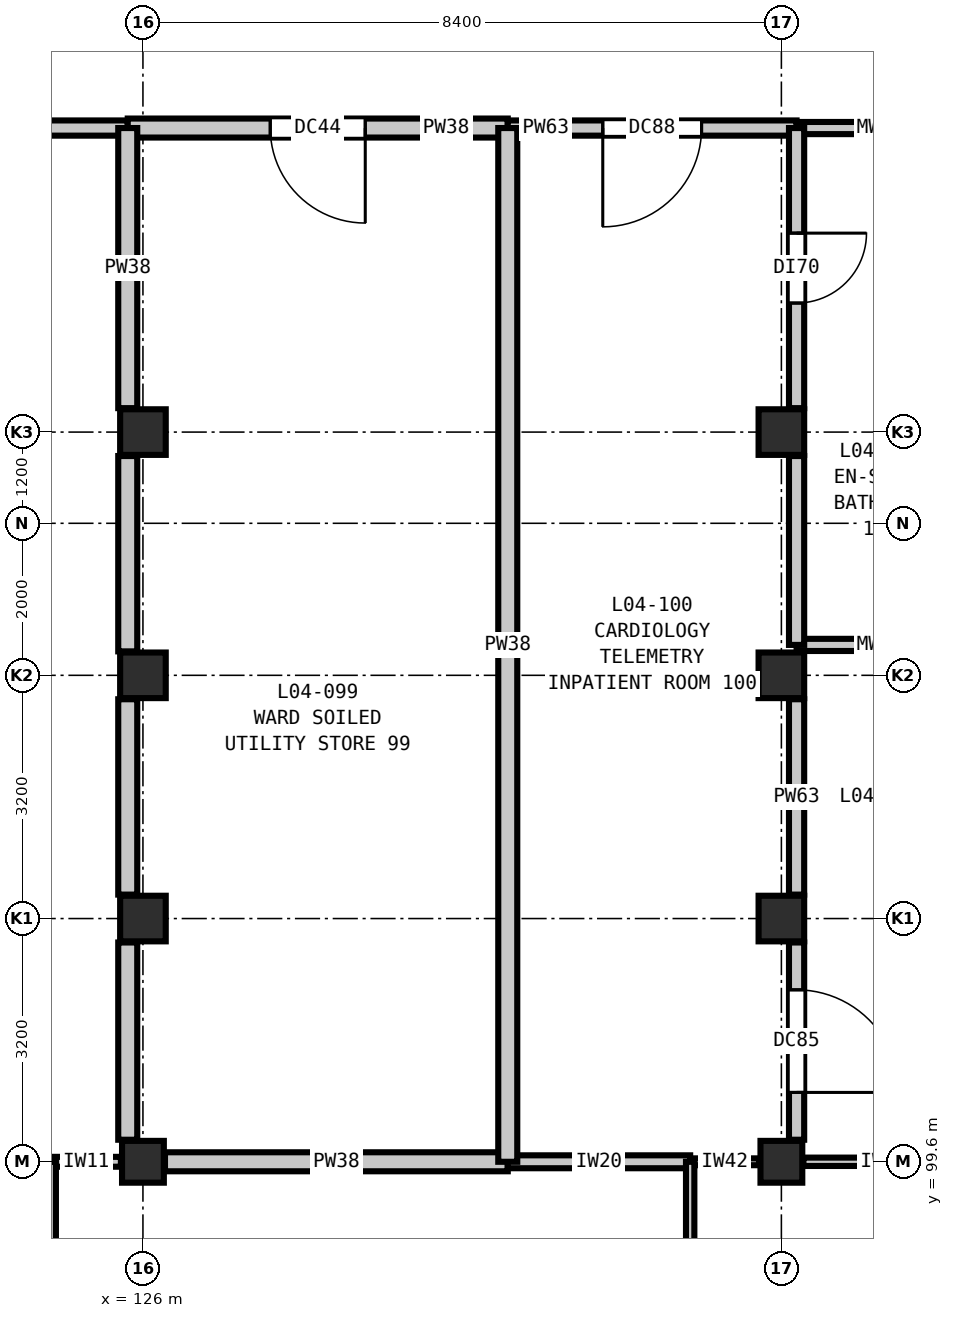
"""IFC4 building model, lengths in metres.
Left out: names, types, materials, properties, quantities, classifications, styles, units other than length and angle.
Written with IfcOpenShell. Run it as: python <this file> out.ifc"""

import sys

from ifc_helpers import new_model, si_unit, direction, frame, frame_2d, origin, origin_2d, place, context, subcontext, project, spatial, rectangle, extrude, element, fill, save


model = new_model("IFC4")
c1 = context("Model", 3, precision=1e-05, world=origin(), true_north=direction((0.0, 1.0)))
c2 = subcontext(c1, "Body", "Model", "MODEL_VIEW")
j1 = project(units=[si_unit("LENGTHUNIT", "METRE"), si_unit("PLANEANGLEUNIT", "RADIAN")], contexts=[c1])
p1 = place(None, origin())
s1 = spatial("IfcSite", under=j1, at=p1, CompositionType="ELEMENT")
p2 = place(p1, origin())
s2 = spatial("IfcBuilding", under=s1, at=p2, CompositionType="ELEMENT")
p3 = place(p2, frame((0.0, 0.0, 20.4)))
s3 = spatial("IfcBuildingStorey", under=s2, at=p3, CompositionType="ELEMENT", Elevation=20.4)
p4 = place(p3, frame((126.0, 99.6, 0.0), z_axis=(0.0, 0.0, 1.0), x_axis=(1.0, 0.0, 0.0)))
e1 = element("IfcColumn", 1, at=p4, inside=s3, PredefinedType="COLUMN", context=c2, shape_type="SweptSolid", body=[
    extrude(rectangle(XDim=0.55, YDim=0.55, at=origin_2d()), origin(), (0.0, 0.0, 1.0), 4.2),
])
for number, where, z_axis, x_axis in (
    (2, (126.0, 102.8, 0.0), (0.0, 0.0, 1.0), (1.0, 0.0, 0.0)),
    (3, (126.0, 106.0, 0.0), (0.0, 0.0, 1.0), (1.0, 0.0, 0.0)),
    (4, (126.0, 109.2, 0.0), (0.0, 0.0, 1.0), (1.0, 0.0, 0.0)),
):
    element("IfcColumn", number, at=place(p3, frame(where, z_axis=z_axis, x_axis=x_axis)), inside=s3, PredefinedType="COLUMN", context=c2, shape_type="SweptSolid", body=[
        extrude(rectangle(XDim=0.6, YDim=0.6, at=origin_2d()), origin(), (0.0, 0.0, 1.0), 4.2),
    ])
p5 = place(p3, frame((134.4, 99.6, 0.0), z_axis=(0.0, 0.0, 1.0), x_axis=(1.0, 0.0, 0.0)))
e5 = element("IfcColumn", 5, at=p5, inside=s3, PredefinedType="COLUMN", context=c2, shape_type="SweptSolid", body=[
    extrude(rectangle(XDim=0.55, YDim=0.55, at=origin_2d()), origin(), (0.0, 0.0, 1.0), 4.2),
])
for number, where, z_axis, x_axis in (
    (6, (134.4, 102.8, 0.0), (0.0, 0.0, 1.0), (1.0, 0.0, 0.0)),
    (7, (134.4, 106.0, 0.0), (0.0, 0.0, 1.0), (1.0, 0.0, 0.0)),
    (8, (134.4, 109.2, 0.0), (0.0, 0.0, 1.0), (1.0, 0.0, 0.0)),
):
    element("IfcColumn", number, at=place(p3, frame(where, z_axis=z_axis, x_axis=x_axis)), inside=s3, PredefinedType="COLUMN", context=c2, shape_type="SweptSolid", body=[
        extrude(rectangle(XDim=0.6, YDim=0.6, at=origin_2d()), origin(), (0.0, 0.0, 1.0), 4.2),
    ])
p6 = place(p3, frame((122.6, 99.6, 0.0), z_axis=(0.0, 0.0, 1.0), x_axis=(1.0, 0.0, 0.0)))
e9 = element("IfcWall", 9, at=p6, inside=s3, PredefinedType="PARTITIONING", context=c2, shape_type="SweptSolid", body=[
    extrude(rectangle(XDim=2.2, YDim=0.11, at=frame_2d((1.1, 0.0))), origin(), (0.0, 0.0, 1.0), 3.585),
])
p7 = place(p3, frame((124.8, 99.6, 0.0), z_axis=(0.0, 0.0, 1.0), x_axis=(1.0, 0.0, 0.0)))
e10 = element("IfcWall", 10, at=p7, inside=s3, PredefinedType="PARTITIONING", context=c2, shape_type="SweptSolid", body=[
    extrude(rectangle(XDim=0.91, YDim=0.13, at=frame_2d((0.455, 0.0))), origin(), (0.0, 0.0, 1.0), 3.585),
])
p8 = place(p3, frame((126.29, 99.6, 0.0), z_axis=(0.0, 0.0, 1.0), x_axis=(1.0, 0.0, 0.0)))
e11 = element("IfcWall", 11, at=p8, inside=s3, PredefinedType="PARTITIONING", context=c2, shape_type="SweptSolid", body=[
    extrude(rectangle(XDim=4.51, YDim=0.25, at=frame_2d((2.255, 0.0))), origin(), (0.0, 0.0, 1.0), 3.585),
])
p9 = place(p3, frame((130.8, 99.6, 0.0), z_axis=(0.0, 0.0, 1.0), x_axis=(1.0, 0.0, 0.0)))
e12 = element("IfcWall", 12, at=p9, inside=s3, PredefinedType="PARTITIONING", context=c2, shape_type="SweptSolid", body=[
    extrude(rectangle(XDim=2.4, YDim=0.17, at=frame_2d((1.2, 0.0))), origin(), (0.0, 0.0, 1.0), 3.585),
])
p10 = place(p3, frame((133.2, 99.6, 0.0), z_axis=(0.0, 0.0, 1.0), x_axis=(1.0, 0.0, 0.0)))
e13 = element("IfcWall", 13, at=p10, inside=s3, PredefinedType="PARTITIONING", context=c2, shape_type="SweptSolid", body=[
    extrude(rectangle(XDim=0.91, YDim=0.09, at=frame_2d((0.455, 0.0))), origin(), (0.0, 0.0, 1.0), 3.585),
])
p11 = place(p3, frame((134.69, 99.6, 0.0), z_axis=(0.0, 0.0, 1.0), x_axis=(1.0, 0.0, 0.0)))
e14 = element("IfcWall", 14, at=p11, inside=s3, PredefinedType="PARTITIONING", context=c2, shape_type="SweptSolid", body=[
    extrude(rectangle(XDim=2.11, YDim=0.11, at=frame_2d((1.055, 0.0))), origin(), (0.0, 0.0, 1.0), 3.585),
])
p12 = place(p3, frame((134.6, 106.4, 0.0), z_axis=(0.0, 0.0, 1.0), x_axis=(1.0, 0.0, 0.0)))
e15 = element("IfcWall", 15, at=p12, inside=s3, PredefinedType="PLUMBINGWALL", context=c2, shape_type="SweptSolid", body=[
    extrude(rectangle(XDim=2.2, YDim=0.16, at=frame_2d((1.1, 0.0))), origin(), (0.0, 0.0, 1.0), 3.82),
])
p13 = place(p3, frame((118.8, 113.2, 0.0), z_axis=(0.0, 0.0, 1.0), x_axis=(1.0, 0.0, 0.0)))
e16 = element("IfcWall", 16, at=p13, inside=s3, PredefinedType="PARTITIONING", context=c2, shape_type="SweptSolid", body=[
    extrude(rectangle(XDim=7.0, YDim=0.2, at=frame_2d((3.5, 0.0))), origin(), (0.0, 0.0, 1.0), 3.82),
])
p14 = place(p13, frame((2.575, 0.0, 0.0)))
e17 = element("IfcOpeningElement", 17, at=p14, cuts=e16, PredefinedType="OPENING", context=c2, shape_type="SweptSolid", body=[
    extrude(rectangle(XDim=1.85, YDim=2.3, at=frame_2d((0.925, 1.15))), frame((0.0, 0.11, 0.0), z_axis=(0.0, -1.0, 0.0), x_axis=(1.0, 0.0, 0.0)), (0.0, 0.0, 1.0), 0.22),
])
p15 = place(p3, frame((125.8, 113.2, 0.0), z_axis=(0.0, 0.0, 1.0), x_axis=(1.0, 0.0, 0.0)))
e18 = element("IfcWall", 18, at=p15, inside=s3, PredefinedType="PARTITIONING", context=c2, shape_type="SweptSolid", body=[
    extrude(rectangle(XDim=5.0, YDim=0.25, at=frame_2d((2.5, 0.0))), origin(), (0.0, 0.0, 1.0), 3.82),
])
p16 = place(p15, frame((1.875, 0.0, 0.0)))
e19 = element("IfcOpeningElement", 19, at=p16, cuts=e18, PredefinedType="OPENING", context=c2, shape_type="SweptSolid", body=[
    extrude(rectangle(XDim=1.25, YDim=2.15, at=frame_2d((0.625, 1.075))), frame((0.0, 0.135, 0.0), z_axis=(0.0, -1.0, 0.0), x_axis=(1.0, 0.0, 0.0)), (0.0, 0.0, 1.0), 0.27),
])
p17 = place(p3, frame((130.8, 113.2, 0.0), z_axis=(0.0, 0.0, 1.0), x_axis=(1.0, 0.0, 0.0)))
e20 = element("IfcWall", 20, at=p17, inside=s3, PredefinedType="PARTITIONING", context=c2, shape_type="SweptSolid", body=[
    extrude(rectangle(XDim=3.8, YDim=0.2, at=frame_2d((1.9, 0.0))), origin(), (0.0, 0.0, 1.0), 3.82),
])
p18 = place(p17, frame((1.25, 0.0, 0.0)))
e21 = element("IfcOpeningElement", 21, at=p18, cuts=e20, PredefinedType="OPENING", context=c2, shape_type="SweptSolid", body=[
    extrude(rectangle(XDim=1.3, YDim=2.2, at=frame_2d((0.65, 1.1))), frame((0.0, 0.11, 0.0), z_axis=(0.0, -1.0, 0.0), x_axis=(1.0, 0.0, 0.0)), (0.0, 0.0, 1.0), 0.22),
])
p19 = place(p3, frame((134.6, 113.2, 0.0), z_axis=(0.0, 0.0, 1.0), x_axis=(1.0, 0.0, 0.0)))
e22 = element("IfcWall", 22, at=p19, inside=s3, PredefinedType="PLUMBINGWALL", context=c2, shape_type="SweptSolid", body=[
    extrude(rectangle(XDim=2.2, YDim=0.16, at=frame_2d((1.1, 0.0))), origin(), (0.0, 0.0, 1.0), 3.82),
])
p20 = place(p3, frame((124.8, 94.1, 0.0), z_axis=(0.0, 0.0, 1.0), x_axis=(0.0, 1.0, 0.0)))
e23 = element("IfcWall", 23, at=p20, inside=s3, PredefinedType="PARTITIONING", context=c2, shape_type="SweptSolid", body=[
    extrude(rectangle(XDim=5.5, YDim=0.11, at=frame_2d((2.75, 0.0))), origin(), (0.0, 0.0, 1.0), 3.82),
])
p21 = place(p3, frame((125.8, 109.515, 0.0), z_axis=(0.0, 0.0, 1.0), x_axis=(0.0, 1.0, 0.0)))
e24 = element("IfcWall", 24, at=p21, inside=s3, PredefinedType="PARTITIONING", context=c2, shape_type="SweptSolid", body=[
    extrude(rectangle(XDim=3.685, YDim=0.25, at=frame_2d((1.843, 0.0))), origin(), (0.0, 0.0, 1.0), 3.585),
])
p22 = place(p3, frame((125.8, 99.89, 0.0), z_axis=(0.0, 0.0, 1.0), x_axis=(0.0, 1.0, 0.0)))
e25 = element("IfcWall", 25, at=p22, inside=s3, PredefinedType="PARTITIONING", context=c2, shape_type="SweptSolid", body=[
    extrude(rectangle(XDim=2.595, YDim=0.25, at=frame_2d((1.298, 0.0))), origin(), (0.0, 0.0, 1.0), 3.585),
])
for number, where, z_axis, x_axis in (
    (26, (125.8, 103.115, 0.0), (0.0, 0.0, 1.0), (0.0, 1.0, 0.0)),
    (27, (125.8, 106.315, 0.0), (0.0, 0.0, 1.0), (0.0, 1.0, 0.0)),
):
    element("IfcWall", number, at=place(p3, frame(where, z_axis=z_axis, x_axis=x_axis)), inside=s3, PredefinedType="PARTITIONING", context=c2, shape_type="SweptSolid", body=[
        extrude(rectangle(XDim=2.57, YDim=0.25, at=frame_2d((1.285, 0.0))), origin(), (0.0, 0.0, 1.0), 3.585),
    ])
p23 = place(p3, frame((130.8, 99.6, 0.0), z_axis=(0.0, 0.0, 1.0), x_axis=(0.0, 1.0, 0.0)))
e28 = element("IfcWall", 28, at=p23, inside=s3, PredefinedType="PARTITIONING", context=c2, shape_type="SweptSolid", body=[
    extrude(rectangle(XDim=13.6, YDim=0.25, at=frame_2d((6.8, 0.0))), origin(), (0.0, 0.0, 1.0), 3.82),
])
p24 = place(p3, frame((133.2, 88.6, 0.0), z_axis=(0.0, 0.0, 1.0), x_axis=(0.0, 1.0, 0.0)))
e29 = element("IfcWall", 29, at=p24, inside=s3, PredefinedType="PARTITIONING", context=c2, shape_type="SweptSolid", body=[
    extrude(rectangle(XDim=11.0, YDim=0.11, at=frame_2d((5.5, 0.0))), origin(), (0.0, 0.0, 1.0), 3.82),
])
p25 = place(p3, frame((134.6, 99.89, 0.0), z_axis=(0.0, 0.0, 1.0), x_axis=(0.0, 1.0, 0.0)))
e30 = element("IfcWall", 30, at=p25, inside=s3, PredefinedType="PARTITIONING", context=c2, shape_type="SweptSolid", body=[
    extrude(rectangle(XDim=2.595, YDim=0.2, at=frame_2d((1.298, 0.0))), origin(), (0.0, 0.0, 1.0), 3.585),
])
p26 = place(p25, frame((0.623, 0.0, 0.0)))
e31 = element("IfcOpeningElement", 31, at=p26, cuts=e30, PredefinedType="OPENING", context=c2, shape_type="SweptSolid", body=[
    extrude(rectangle(XDim=1.35, YDim=2.2, at=frame_2d((0.675, 1.1))), frame((0.0, 0.11, 0.0), z_axis=(0.0, -1.0, 0.0), x_axis=(1.0, 0.0, 0.0)), (0.0, 0.0, 1.0), 0.22),
])
p27 = place(p3, frame((134.6, 103.115, 0.0), z_axis=(0.0, 0.0, 1.0), x_axis=(0.0, 1.0, 0.0)))
e32 = element("IfcWall", 32, at=p27, inside=s3, PredefinedType="PARTITIONING", context=c2, shape_type="SweptSolid", body=[
    extrude(rectangle(XDim=2.57, YDim=0.2, at=frame_2d((1.285, 0.0))), origin(), (0.0, 0.0, 1.0), 3.585),
])
p28 = place(p3, frame((134.6, 109.515, 0.0), z_axis=(0.0, 0.0, 1.0), x_axis=(0.0, 1.0, 0.0)))
e33 = element("IfcWall", 33, at=p28, inside=s3, PredefinedType="PARTITIONING", context=c2, shape_type="SweptSolid", body=[
    extrude(rectangle(XDim=3.685, YDim=0.2, at=frame_2d((1.843, 0.0))), origin(), (0.0, 0.0, 1.0), 3.585),
])
p29 = place(p28, frame((1.383, 0.0, 0.0)))
e34 = element("IfcOpeningElement", 34, at=p29, cuts=e33, PredefinedType="OPENING", context=c2, shape_type="SweptSolid", body=[
    extrude(rectangle(XDim=0.92, YDim=2.1, at=frame_2d((0.46, 1.05))), frame((0.0, 0.11, 0.0), z_axis=(0.0, -1.0, 0.0), x_axis=(1.0, 0.0, 0.0)), (0.0, 0.0, 1.0), 0.22),
])
p30 = place(p3, frame((134.6, 106.4, 0.0), z_axis=(0.0, 0.0, 1.0), x_axis=(0.0, 1.0, 0.0)))
e35 = element("IfcWall", 35, at=p30, inside=s3, PredefinedType="PARTITIONING", context=c2, shape_type="SweptSolid", body=[
    extrude(rectangle(XDim=2.485, YDim=0.2, at=frame_2d((1.243, 0.0))), origin(), (0.0, 0.0, 1.0), 3.585),
])
p31 = place(p16, frame((1.25, 0.0, 0.0), z_axis=(0.0, 0.0, 1.0), x_axis=(-1.0, 0.0, 0.0)))
e36 = element("IfcDoor", 36, at=p31, inside=s3, OperationType="SINGLE_SWING_LEFT", PredefinedType="DOOR", context=c2, shape_type="SweptSolid", body=[
    extrude(rectangle(XDim=1.25, YDim=2.15, at=frame_2d((0.625, 1.075))), frame((0.0, 0.025, 0.0), z_axis=(0.0, -1.0, 0.0), x_axis=(1.0, 0.0, 0.0)), (0.0, 0.0, 1.0), 0.05),
])
fill(e19, e36)
p32 = place(p18, frame((1.3, 0.0, 0.0), z_axis=(0.0, 0.0, 1.0), x_axis=(-1.0, 0.0, 0.0)))
e37 = element("IfcDoor", 37, at=p32, inside=s3, OperationType="SINGLE_SWING_RIGHT", PredefinedType="DOOR", context=c2, shape_type="SweptSolid", body=[
    extrude(rectangle(XDim=1.3, YDim=2.2, at=frame_2d((0.65, 1.1))), frame((0.0, 0.025, 0.0), z_axis=(0.0, -1.0, 0.0), x_axis=(1.0, 0.0, 0.0)), (0.0, 0.0, 1.0), 0.05),
])
fill(e21, e37)
p33 = place(p26, frame((1.35, 0.0, 0.0), z_axis=(0.0, 0.0, 1.0), x_axis=(-1.0, 0.0, 0.0)))
e38 = element("IfcDoor", 38, at=p33, inside=s3, OperationType="SINGLE_SWING_RIGHT", PredefinedType="DOOR", context=c2, shape_type="SweptSolid", body=[
    extrude(rectangle(XDim=1.35, YDim=2.2, at=frame_2d((0.675, 1.1))), frame((0.0, 0.025, 0.0), z_axis=(0.0, -1.0, 0.0), x_axis=(1.0, 0.0, 0.0)), (0.0, 0.0, 1.0), 0.05),
])
fill(e31, e38)
p34 = place(p29, frame((0.92, 0.0, 0.0), z_axis=(0.0, 0.0, 1.0), x_axis=(-1.0, 0.0, 0.0)))
e39 = element("IfcDoor", 39, at=p34, inside=s3, OperationType="SINGLE_SWING_LEFT", PredefinedType="DOOR", context=c2, shape_type="SweptSolid", body=[
    extrude(rectangle(XDim=0.92, YDim=2.1, at=frame_2d((0.46, 1.05))), frame((0.0, 0.025, 0.0), z_axis=(0.0, -1.0, 0.0), x_axis=(1.0, 0.0, 0.0)), (0.0, 0.0, 1.0), 0.05),
])
fill(e34, e39)
save(model, sys.argv[1])
